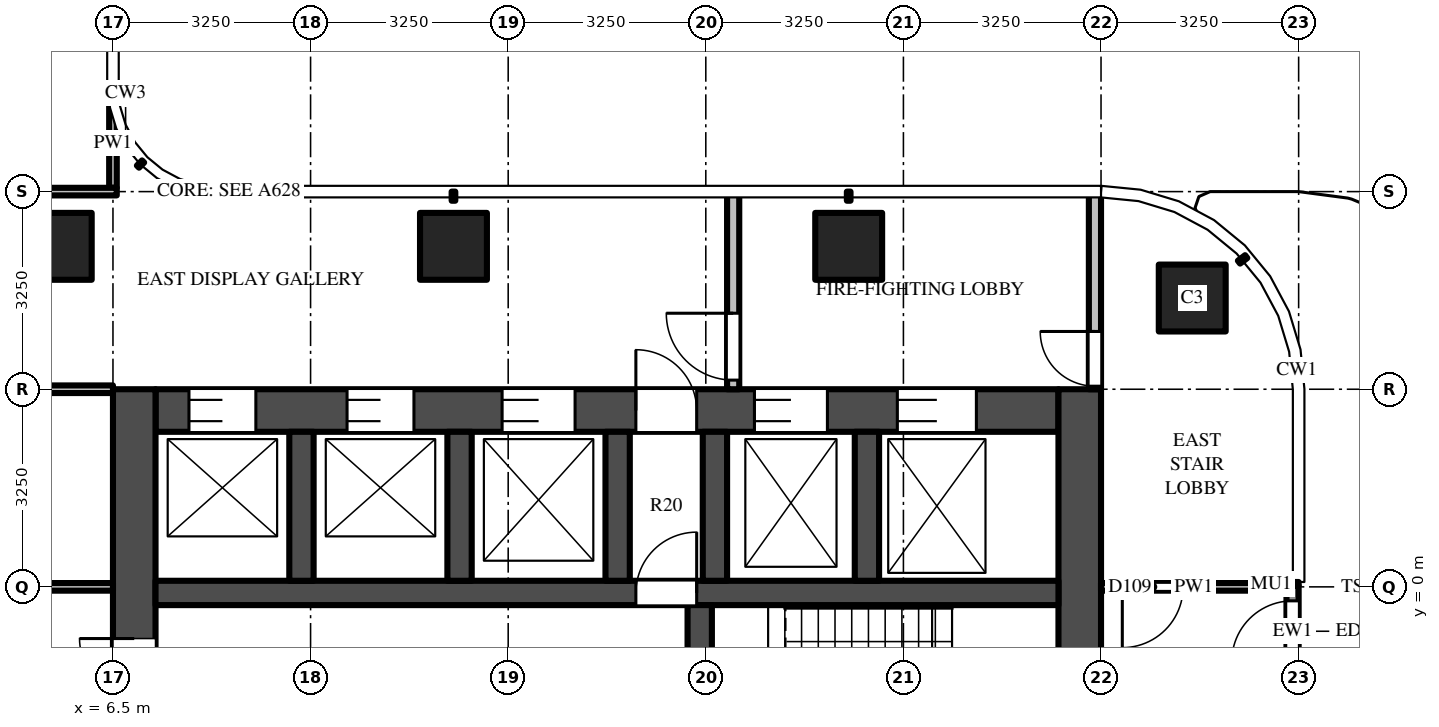
"""IFC4 building model, lengths in metres.
Left out: names, types, materials, properties, quantities, classifications, styles, units other than length and angle.
Written with IfcOpenShell. Run it as: python <this file> out.ifc"""

import sys

from ifc_helpers import new_model, si_unit, direction, frame, frame_2d, origin, origin_2d, place, context, subcontext, project, spatial, rectangle, extrude, source, transform, mapped, element, fill, save


model = new_model("IFC4")
c1 = context("Model", 3, precision=1e-05, world=origin(), true_north=direction((0.0, 1.0)))
c2 = subcontext(c1, "Body", "Model", "MODEL_VIEW")
j1 = project(units=[si_unit("LENGTHUNIT", "METRE"), si_unit("PLANEANGLEUNIT", "RADIAN")], contexts=[c1])
p1 = place(None, origin())
s1 = spatial("IfcSite", under=j1, at=p1, CompositionType="ELEMENT")
p2 = place(p1, origin())
s2 = spatial("IfcBuilding", under=s1, at=p2, CompositionType="ELEMENT")
p3 = place(p2, frame((0.0, 0.0, 220.7)))
s3 = spatial("IfcBuildingStorey", under=s2, at=p3, CompositionType="ELEMENT", Elevation=220.7)
m1 = source(origin(), c2, "Body", "SweptSolid", [
    extrude(rectangle(XDim=1.1, YDim=1.1, at=origin_2d()), origin(), (0.0, 0.0, 1.0), 3.9),
])
for number, where, z_axis, x_axis in (
    (1, (12.1, 5.6, 0.0), (0.0, 0.0, 1.0), (1.0, 0.0, 0.0)),
    (2, (18.6, 5.6, 0.0), (0.0, 0.0, 1.0), (1.0, 0.0, 0.0)),
    (3, (24.25, 4.75, 0.0), (0.0, 0.0, 1.0), (1.0, 0.0, 0.0)),
    (4, (5.6, 5.6, 0.0), (0.0, 0.0, 1.0), (1.0, 0.0, 0.0)),
):
    element("IfcColumn", number, at=place(p3, frame(where, z_axis=z_axis, x_axis=x_axis)), inside=s3, PredefinedType="COLUMN", context=c2, shape_type="MappedRepresentation", body=[
        mapped(m1, transform((0.0, 0.0, 0.0))),
    ])
m2 = source(origin(), c2, "Body", "SweptSolid", [
    extrude(rectangle(XDim=14.85, YDim=0.7, at=frame_2d((7.425, 0.0))), origin(), (0.0, 0.0, 1.0), 3.7),
])
p4 = place(p3, frame((7.2, 2.9, 0.0), z_axis=(0.0, 0.0, 1.0), x_axis=(1.0, 0.0, 0.0)))
e5 = element("IfcWall", 5, at=p4, inside=s3, PredefinedType="SHEAR", context=c2, shape_type="MappedRepresentation", body=[
    mapped(m2, transform((0.0, 0.0, 0.0))),
])
m3 = source(origin(), c2, "Body", "SweptSolid", [
    extrude(rectangle(XDim=1.1, YDim=2.1, at=frame_2d((0.55, 1.05))), frame((0.0, 0.36, 0.0), z_axis=(0.0, -1.0, 0.0), x_axis=(1.0, 0.0, 0.0)), (0.0, 0.0, 1.0), 0.72),
])
p5 = place(p4, frame((0.55, 0.0, 0.0)))
e6 = element("IfcOpeningElement", 6, at=p5, cuts=e5, PredefinedType="OPENING", context=c2, shape_type="MappedRepresentation", body=[
    mapped(m3, transform((0.0, 0.0, 0.0))),
])
p6 = place(p4, frame((3.15, 0.0, 0.0)))
e7 = element("IfcOpeningElement", 7, at=p6, cuts=e5, PredefinedType="OPENING", context=c2, shape_type="MappedRepresentation", body=[
    mapped(m3, transform((0.0, 0.0, 0.0))),
])
m4 = source(origin(), c2, "Body", "SweptSolid", [
    extrude(rectangle(XDim=1.2, YDim=2.1, at=frame_2d((0.6, 1.05))), frame((0.0, 0.36, 0.0), z_axis=(0.0, -1.0, 0.0), x_axis=(1.0, 0.0, 0.0)), (0.0, 0.0, 1.0), 0.72),
])
p7 = place(p4, frame((5.7, 0.0, 0.0)))
e8 = element("IfcOpeningElement", 8, at=p7, cuts=e5, PredefinedType="OPENING", context=c2, shape_type="MappedRepresentation", body=[
    mapped(m4, transform((0.0, 0.0, 0.0))),
])
m5 = source(origin(), c2, "Body", "SweptSolid", [
    extrude(rectangle(XDim=1.3, YDim=2.1, at=frame_2d((0.65, 1.05))), frame((0.0, 0.36, 0.0), z_axis=(0.0, -1.0, 0.0), x_axis=(1.0, 0.0, 0.0)), (0.0, 0.0, 1.0), 0.72),
])
p8 = place(p4, frame((12.2, 0.0, 0.0)))
e9 = element("IfcOpeningElement", 9, at=p8, cuts=e5, PredefinedType="OPENING", context=c2, shape_type="MappedRepresentation", body=[
    mapped(m5, transform((0.0, 0.0, 0.0))),
])
p9 = place(p4, frame((9.85, 0.0, 0.0)))
e10 = element("IfcOpeningElement", 10, at=p9, cuts=e5, PredefinedType="OPENING", context=c2, shape_type="MappedRepresentation", body=[
    mapped(m4, transform((0.0, 0.0, 0.0))),
])
m6 = source(origin(), c2, "Body", "SweptSolid", [
    extrude(rectangle(XDim=1.0, YDim=2.1, at=frame_2d((0.5, 1.05))), frame((0.0, 0.36, 0.0), z_axis=(0.0, -1.0, 0.0), x_axis=(1.0, 0.0, 0.0)), (0.0, 0.0, 1.0), 0.72),
])
p10 = place(p4, frame((7.9, 0.0, 0.0)))
e11 = element("IfcOpeningElement", 11, at=p10, cuts=e5, PredefinedType="OPENING", context=c2, shape_type="MappedRepresentation", body=[
    mapped(m6, transform((0.0, 0.0, 0.0))),
])
m7 = source(origin(), c2, "Body", "SweptSolid", [
    extrude(rectangle(XDim=9.05, YDim=0.7, at=frame_2d((4.525, 0.0))), origin(), (0.0, 0.0, 1.0), 3.7),
])
p11 = place(p3, frame((6.85, -5.8, 0.0), z_axis=(0.0, 0.0, 1.0), x_axis=(0.0, 1.0, 0.0)))
e12 = element("IfcWall", 12, at=p11, inside=s3, PredefinedType="SHEAR", context=c2, shape_type="MappedRepresentation", body=[
    mapped(m7, transform((0.0, 0.0, 0.0))),
])
m8 = source(origin(), c2, "Body", "SweptSolid", [
    extrude(rectangle(XDim=1.8, YDim=2.1, at=frame_2d((0.9, 1.05))), frame((0.0, 0.36, 0.0), z_axis=(0.0, -1.0, 0.0), x_axis=(1.0, 0.0, 0.0)), (0.0, 0.0, 1.0), 0.72),
])
p12 = place(p11, frame((3.15, 0.0, 0.0)))
e13 = element("IfcOpeningElement", 13, at=p12, cuts=e12, PredefinedType="OPENING", context=c2, shape_type="MappedRepresentation", body=[
    mapped(m8, transform((0.0, 0.0, 0.0))),
])
p13 = place(p3, frame((22.4, -5.8, 0.0), z_axis=(0.0, 0.0, 1.0), x_axis=(0.0, 1.0, 0.0)))
e14 = element("IfcWall", 14, at=p13, inside=s3, PredefinedType="SHEAR", context=c2, shape_type="MappedRepresentation", body=[
    mapped(m7, transform((0.0, 0.0, 0.0))),
])
m9 = source(origin(), c2, "Body", "SweptSolid", [
    extrude(rectangle(XDim=14.85, YDim=0.4, at=frame_2d((7.425, 0.0))), origin(), (0.0, 0.0, 1.0), 3.7),
])
p14 = place(p3, frame((7.2, -0.1, 0.0), z_axis=(0.0, 0.0, 1.0), x_axis=(1.0, 0.0, 0.0)))
e15 = element("IfcWall", 15, at=p14, inside=s3, PredefinedType="SHEAR", context=c2, shape_type="MappedRepresentation", body=[
    mapped(m9, transform((0.0, 0.0, 0.0))),
])
m10 = source(origin(), c2, "Body", "SweptSolid", [
    extrude(rectangle(XDim=1.0, YDim=2.1, at=frame_2d((0.5, 1.05))), frame((0.0, 0.21, 0.0), z_axis=(0.0, -1.0, 0.0), x_axis=(1.0, 0.0, 0.0)), (0.0, 0.0, 1.0), 0.42),
])
p15 = place(p14, frame((7.9, 0.0, 0.0)))
e16 = element("IfcOpeningElement", 16, at=p15, cuts=e15, PredefinedType="OPENING", context=c2, shape_type="MappedRepresentation", body=[
    mapped(m10, transform((0.0, 0.0, 0.0))),
])
m11 = source(origin(), c2, "Body", "SweptSolid", [
    extrude(rectangle(XDim=5.5, YDim=0.4, at=frame_2d((2.75, 0.0))), origin(), (0.0, 0.0, 1.0), 3.7),
])
p16 = place(p3, frame((16.15, -5.8, 0.0), z_axis=(0.0, 0.0, 1.0), x_axis=(0.0, 1.0, 0.0)))
e17 = element("IfcWall", 17, at=p16, inside=s3, PredefinedType="SHEAR", context=c2, shape_type="MappedRepresentation", body=[
    mapped(m11, transform((0.0, 0.0, 0.0))),
])
m12 = source(origin(), c2, "Body", "SweptSolid", [
    extrude(rectangle(XDim=1.1, YDim=2.1, at=frame_2d((0.55, 1.05))), frame((0.0, 0.21, 0.0), z_axis=(0.0, -1.0, 0.0), x_axis=(1.0, 0.0, 0.0)), (0.0, 0.0, 1.0), 0.42),
])
p17 = place(p16, frame((0.725, 0.0, 0.0)))
e18 = element("IfcOpeningElement", 18, at=p17, cuts=e17, PredefinedType="OPENING", context=c2, shape_type="MappedRepresentation", body=[
    mapped(m12, transform((0.0, 0.0, 0.0))),
])
p18 = place(p16, frame((3.675, 0.0, 0.0)))
e19 = element("IfcOpeningElement", 19, at=p18, cuts=e17, PredefinedType="OPENING", context=c2, shape_type="MappedRepresentation", body=[
    mapped(m12, transform((0.0, 0.0, 0.0))),
])
m13 = source(origin(), c2, "Body", "SweptSolid", [
    extrude(rectangle(XDim=2.45, YDim=0.4, at=frame_2d((1.225, 0.0))), origin(), (0.0, 0.0, 1.0), 3.7),
])
for number, where, z_axis, x_axis in (
    (20, (9.6, 0.1, 0.0), (0.0, 0.0, 1.0), (0.0, 1.0, 0.0)),
    (21, (12.2, 0.1, 0.0), (0.0, 0.0, 1.0), (0.0, 1.0, 0.0)),
    (22, (14.8, 0.1, 0.0), (0.0, 0.0, 1.0), (0.0, 1.0, 0.0)),
    (23, (16.4, 0.1, 0.0), (0.0, 0.0, 1.0), (0.0, 1.0, 0.0)),
    (24, (18.9, 0.1, 0.0), (0.0, 0.0, 1.0), (0.0, 1.0, 0.0)),
):
    element("IfcWall", number, at=place(p3, frame(where, z_axis=z_axis, x_axis=x_axis)), inside=s3, PredefinedType="SHEAR", context=c2, shape_type="MappedRepresentation", body=[
        mapped(m13, transform((0.0, 0.0, 0.0))),
    ])
m14 = source(origin(), c2, "Body", "SweptSolid", [
    extrude(rectangle(XDim=3.25, YDim=0.2, at=frame_2d((1.625, 0.0))), origin(), (0.0, 0.0, 1.0), 3.7),
])
p19 = place(p3, frame((16.7, 3.25, 0.0), z_axis=(0.0, 0.0, 1.0), x_axis=(0.0, 1.0, 0.0)))
e25 = element("IfcWall", 25, at=p19, inside=s3, PredefinedType="PARTITIONING", context=c2, shape_type="MappedRepresentation", body=[
    mapped(m14, transform((0.0, 0.0, 0.0))),
])
m15 = source(origin(), c2, "Body", "SweptSolid", [
    extrude(rectangle(XDim=1.1, YDim=2.1, at=frame_2d((0.55, 1.05))), frame((0.0, 0.11, 0.0), z_axis=(0.0, -1.0, 0.0), x_axis=(1.0, 0.0, 0.0)), (0.0, 0.0, 1.0), 0.22),
])
p20 = place(p19, frame((0.15, 0.0, 0.0)))
e26 = element("IfcOpeningElement", 26, at=p20, cuts=e25, PredefinedType="OPENING", context=c2, shape_type="MappedRepresentation", body=[
    mapped(m15, transform((0.0, 0.0, 0.0))),
])
p21 = place(p3, frame((22.65, 3.25, 0.0), z_axis=(0.0, 0.0, 1.0), x_axis=(0.0, 1.0, 0.0)))
e27 = element("IfcWall", 27, at=p21, inside=s3, PredefinedType="PARTITIONING", context=c2, shape_type="MappedRepresentation", body=[
    mapped(m14, transform((0.0, 0.0, 0.0))),
])
m16 = source(origin(), c2, "Body", "SweptSolid", [
    extrude(rectangle(XDim=0.9, YDim=2.1, at=frame_2d((0.45, 1.05))), frame((0.0, 0.11, 0.0), z_axis=(0.0, -1.0, 0.0), x_axis=(1.0, 0.0, 0.0)), (0.0, 0.0, 1.0), 0.22),
])
p22 = place(p21, frame((0.05, 0.0, 0.0)))
e28 = element("IfcOpeningElement", 28, at=p22, cuts=e27, PredefinedType="OPENING", context=c2, shape_type="MappedRepresentation", body=[
    mapped(m16, transform((0.0, 0.0, 0.0))),
])
m17 = source(origin(), c2, "Body", "SweptSolid", [
    extrude(rectangle(XDim=1.5, YDim=0.2, at=frame_2d((0.75, 0.0))), origin(), (0.0, 0.0, 1.0), 3.7),
])
p23 = place(p3, frame((25.9, -1.48, 0.0), z_axis=(0.0, 0.0, 1.0), x_axis=(0.0, 1.0, 0.0)))
e29 = element("IfcWall", 29, at=p23, inside=s3, PredefinedType="SOLIDWALL", context=c2, shape_type="MappedRepresentation", body=[
    mapped(m17, transform((0.0, 0.0, 0.0))),
])
m18 = source(origin(), c2, "Body", "SweptSolid", [
    extrude(rectangle(XDim=1.0, YDim=2.4, at=frame_2d((0.5, 1.2))), frame((0.0, 0.11, 0.0), z_axis=(0.0, -1.0, 0.0), x_axis=(1.0, 0.0, 0.0)), (0.0, 0.0, 1.0), 0.22),
])
p24 = place(p23, frame((0.25, 0.0, 0.0)))
e30 = element("IfcOpeningElement", 30, at=p24, cuts=e29, PredefinedType="OPENING", context=c2, shape_type="MappedRepresentation", body=[
    mapped(m18, transform((0.0, 0.0, 0.0))),
])
m19 = source(origin(), c2, "Body", "SweptSolid", [
    extrude(rectangle(XDim=1.469, YDim=0.125, at=frame_2d((0.734, 0.0))), origin(), (0.0, 0.0, 1.0), 3.7),
])
p25 = place(p3, frame((6.5, 6.562, 0.0), z_axis=(0.0, 0.0, 1.0), x_axis=(0.0, 1.0, 0.0)))
e31 = element("IfcWall", 31, at=p25, inside=s3, PredefinedType="PARTITIONING", context=c2, shape_type="MappedRepresentation", body=[
    mapped(m19, transform((0.0, 0.0, 0.0))),
])
m20 = source(origin(), c2, "Body", "SweptSolid", [
    extrude(rectangle(XDim=5.363, YDim=0.125, at=frame_2d((2.681, 0.0))), origin(), (0.0, 0.0, 1.0), 2.997),
])
p26 = place(p3, frame((6.5, 0.0, 0.0), z_axis=(0.0, 0.0, 1.0), x_axis=(-1.0, 0.0, 0.0)))
e32 = element("IfcWall", 32, at=p26, inside=s3, PredefinedType="PARTITIONING", context=c2, shape_type="MappedRepresentation", body=[
    mapped(m20, transform((0.0, 0.0, 0.0))),
])
m21 = source(origin(), c2, "Body", "SweptSolid", [
    extrude(rectangle(XDim=1.0, YDim=2.1, at=frame_2d((0.5, 1.05))), frame((0.0, 0.073, 0.0), z_axis=(0.0, -1.0, 0.0), x_axis=(1.0, 0.0, 0.0)), (0.0, 0.0, 1.0), 0.145),
])
p27 = place(p26, frame((3.95, 0.0, 0.0)))
e33 = element("IfcOpeningElement", 33, at=p27, cuts=e32, PredefinedType="OPENING", context=c2, shape_type="MappedRepresentation", body=[
    mapped(m21, transform((0.0, 0.0, 0.0))),
])
m22 = source(origin(), c2, "Body", "SweptSolid", [
    extrude(rectangle(XDim=3.05, YDim=0.125, at=frame_2d((1.525, 0.0))), origin(), (0.0, 0.0, 1.0), 2.78),
])
p28 = place(p3, frame((25.8, 0.0, 0.0), z_axis=(0.0, 0.0, 1.0), x_axis=(-1.0, 0.0, 0.0)))
e34 = element("IfcWall", 34, at=p28, inside=s3, PredefinedType="PARTITIONING", context=c2, shape_type="MappedRepresentation", body=[
    mapped(m22, transform((0.0, 0.0, 0.0))),
])
p29 = place(p28, frame((1.7, 0.0, 0.0)))
e35 = element("IfcOpeningElement", 35, at=p29, cuts=e34, PredefinedType="OPENING", context=c2, shape_type="MappedRepresentation", body=[
    mapped(m21, transform((0.0, 0.0, 0.0))),
])
p30 = place(p3, frame((1.137, 3.25, 0.0), z_axis=(0.0, 0.0, 1.0), x_axis=(1.0, 0.0, 0.0)))
e36 = element("IfcWall", 36, at=p30, inside=s3, PredefinedType="PARTITIONING", context=c2, shape_type="MappedRepresentation", body=[
    mapped(m20, transform((0.0, 0.0, 0.0))),
])
m23 = source(origin(), c2, "Body", "SweptSolid", [
    extrude(rectangle(XDim=5.425, YDim=0.125, at=frame_2d((2.712, 0.0))), origin(), (0.0, 0.0, 1.0), 2.78),
])
p31 = place(p3, frame((1.137, 6.5, 0.0), z_axis=(0.0, 0.0, 1.0), x_axis=(1.0, 0.0, 0.0)))
e37 = element("IfcWall", 37, at=p31, inside=s3, PredefinedType="PARTITIONING", context=c2, shape_type="MappedRepresentation", body=[
    mapped(m23, transform((0.0, 0.0, 0.0))),
])
m24 = source(origin(), c2, "Body", "SweptSolid", [
    extrude(rectangle(XDim=1.1, YDim=2.1, at=frame_2d((0.55, 1.05))), frame((0.0, -0.275, 0.0), z_axis=(0.0, -1.0, 0.0), x_axis=(1.0, 0.0, 0.0)), (0.0, 0.0, 1.0), 0.05),
])
p32 = place(p5, origin())
e38 = element("IfcDoor", 38, at=p32, inside=s3, OperationType="DOUBLE_DOOR_SLIDING", PredefinedType="DOOR", context=c2, shape_type="MappedRepresentation", body=[
    mapped(m24, transform((0.0, 0.0, 0.0))),
])
fill(e6, e38)
p33 = place(p6, origin())
e39 = element("IfcDoor", 39, at=p33, inside=s3, OperationType="DOUBLE_DOOR_SLIDING", PredefinedType="DOOR", context=c2, shape_type="MappedRepresentation", body=[
    mapped(m24, transform((0.0, 0.0, 0.0))),
])
fill(e7, e39)
m25 = source(origin(), c2, "Body", "SweptSolid", [
    extrude(rectangle(XDim=1.2, YDim=2.1, at=frame_2d((0.6, 1.05))), frame((0.0, -0.275, 0.0), z_axis=(0.0, -1.0, 0.0), x_axis=(1.0, 0.0, 0.0)), (0.0, 0.0, 1.0), 0.05),
])
p34 = place(p7, origin())
e40 = element("IfcDoor", 40, at=p34, inside=s3, OperationType="DOUBLE_DOOR_SLIDING", PredefinedType="DOOR", context=c2, shape_type="MappedRepresentation", body=[
    mapped(m25, transform((0.0, 0.0, 0.0))),
])
fill(e8, e40)
m26 = source(origin(), c2, "Body", "SweptSolid", [
    extrude(rectangle(XDim=1.3, YDim=2.1, at=frame_2d((0.65, 1.05))), frame((0.0, -0.275, 0.0), z_axis=(0.0, -1.0, 0.0), x_axis=(1.0, 0.0, 0.0)), (0.0, 0.0, 1.0), 0.05),
])
p35 = place(p8, origin())
e41 = element("IfcDoor", 41, at=p35, inside=s3, OperationType="DOUBLE_DOOR_SLIDING", PredefinedType="DOOR", context=c2, shape_type="MappedRepresentation", body=[
    mapped(m26, transform((0.0, 0.0, 0.0))),
])
fill(e9, e41)
p36 = place(p9, origin())
e42 = element("IfcDoor", 42, at=p36, inside=s3, OperationType="DOUBLE_DOOR_SLIDING", PredefinedType="DOOR", context=c2, shape_type="MappedRepresentation", body=[
    mapped(m25, transform((0.0, 0.0, 0.0))),
])
fill(e10, e42)
m27 = source(origin(), c2, "Body", "SweptSolid", [
    extrude(rectangle(XDim=1.8, YDim=2.1, at=frame_2d((0.9, 1.05))), frame((0.0, -0.275, 0.0), z_axis=(0.0, -1.0, 0.0), x_axis=(1.0, 0.0, 0.0)), (0.0, 0.0, 1.0), 0.05),
])
p37 = place(p12, origin())
e43 = element("IfcDoor", 43, at=p37, inside=s3, OperationType="DOUBLE_DOOR_SINGLE_SWING", PredefinedType="DOOR", context=c2, shape_type="MappedRepresentation", body=[
    mapped(m27, transform((0.0, 0.0, 0.0))),
])
fill(e13, e43)
m28 = source(origin(), c2, "Body", "SweptSolid", [
    extrude(rectangle(XDim=1.0, YDim=2.1, at=frame_2d((0.5, 1.05))), frame((0.0, 0.025, 0.0), z_axis=(0.0, -1.0, 0.0), x_axis=(1.0, 0.0, 0.0)), (0.0, 0.0, 1.0), 0.05),
])
p38 = place(p15, origin())
e44 = element("IfcDoor", 44, at=p38, inside=s3, OperationType="SINGLE_SWING_RIGHT", PredefinedType="DOOR", context=c2, shape_type="MappedRepresentation", body=[
    mapped(m28, transform((0.0, 0.0, 0.0))),
])
fill(e16, e44)
m29 = source(origin(), c2, "Body", "SweptSolid", [
    extrude(rectangle(XDim=1.0, YDim=2.1, at=frame_2d((0.5, 1.05))), frame((0.0, -0.275, 0.0), z_axis=(0.0, -1.0, 0.0), x_axis=(1.0, 0.0, 0.0)), (0.0, 0.0, 1.0), 0.05),
])
p39 = place(p10, origin())
e45 = element("IfcDoor", 45, at=p39, inside=s3, OperationType="SINGLE_SWING_LEFT", PredefinedType="DOOR", context=c2, shape_type="MappedRepresentation", body=[
    mapped(m29, transform((0.0, 0.0, 0.0))),
])
fill(e11, e45)
m30 = source(origin(), c2, "Body", "SweptSolid", [
    extrude(rectangle(XDim=1.1, YDim=2.1, at=frame_2d((0.55, 1.05))), frame((0.0, 0.025, 0.0), z_axis=(0.0, -1.0, 0.0), x_axis=(1.0, 0.0, 0.0)), (0.0, 0.0, 1.0), 0.05),
])
p40 = place(p20, origin())
e46 = element("IfcDoor", 46, at=p40, inside=s3, OperationType="SINGLE_SWING_RIGHT", PredefinedType="DOOR", context=c2, shape_type="MappedRepresentation", body=[
    mapped(m30, transform((0.0, 0.0, 0.0))),
])
fill(e26, e46)
m31 = source(origin(), c2, "Body", "SweptSolid", [
    extrude(rectangle(XDim=0.9, YDim=2.1, at=frame_2d((0.45, 1.05))), frame((0.0, 0.025, 0.0), z_axis=(0.0, -1.0, 0.0), x_axis=(1.0, 0.0, 0.0)), (0.0, 0.0, 1.0), 0.05),
])
p41 = place(p22, origin())
e47 = element("IfcDoor", 47, at=p41, inside=s3, OperationType="SINGLE_SWING_RIGHT", PredefinedType="DOOR", context=c2, shape_type="MappedRepresentation", body=[
    mapped(m31, transform((0.0, 0.0, 0.0))),
])
fill(e28, e47)
m32 = source(origin(), c2, "Body", "SweptSolid", [
    extrude(rectangle(XDim=1.0, YDim=2.4, at=frame_2d((0.5, 1.2))), frame((0.0, 0.025, 0.0), z_axis=(0.0, -1.0, 0.0), x_axis=(1.0, 0.0, 0.0)), (0.0, 0.0, 1.0), 0.05),
])
p42 = place(p24, origin())
e48 = element("IfcDoor", 48, at=p42, inside=s3, OperationType="SINGLE_SWING_LEFT", PredefinedType="DOOR", context=c2, shape_type="MappedRepresentation", body=[
    mapped(m32, transform((0.0, 0.0, 0.0))),
])
fill(e30, e48)
p43 = place(p29, origin())
e49 = element("IfcDoor", 49, at=p43, inside=s3, OperationType="SINGLE_SWING_RIGHT", PredefinedType="DOOR", context=c2, shape_type="MappedRepresentation", body=[
    mapped(m28, transform((0.0, 0.0, 0.0))),
])
fill(e35, e49)
save(model, sys.argv[1])
